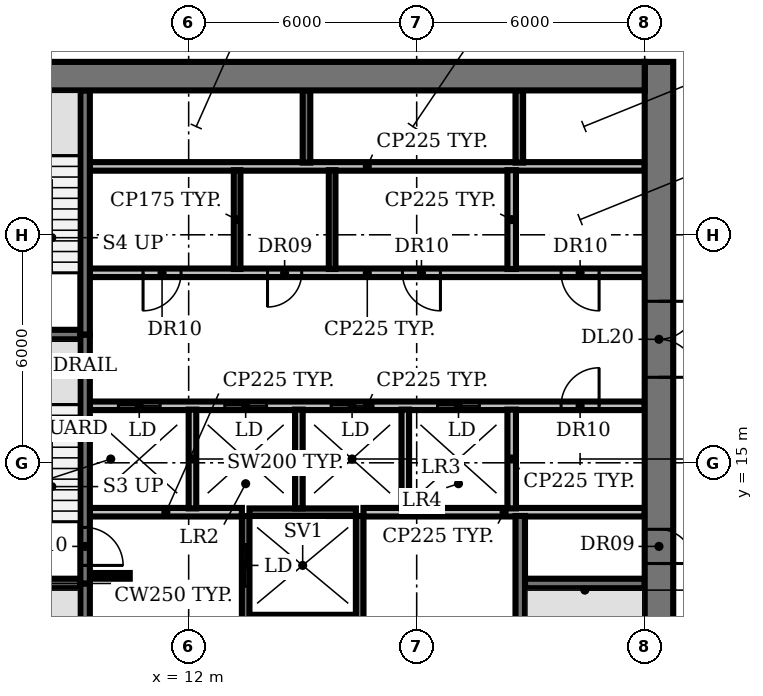
"""IFC4 building model, lengths in metres.
Left out: names, types, materials, properties, quantities, classifications, styles, units other than length and angle.
Written with IfcOpenShell. Run it as: python <this file> out.ifc"""

import sys

from ifc_helpers import new_model, si_unit, direction, frame, frame_2d, origin, place, context, subcontext, project, spatial, rectangle, extrude, element, fill, save


model = new_model("IFC4")
c1 = context("Model", 3, precision=1e-05, world=origin(), true_north=direction((0.0, 1.0)))
c2 = subcontext(c1, "Body", "Model", "MODEL_VIEW")
j1 = project(units=[si_unit("LENGTHUNIT", "METRE"), si_unit("PLANEANGLEUNIT", "RADIAN")], contexts=[c1])
p1 = place(None, origin())
s1 = spatial("IfcSite", under=j1, at=p1, CompositionType="ELEMENT")
p2 = place(p1, origin())
s2 = spatial("IfcBuilding", under=s1, at=p2, CompositionType="ELEMENT")
p3 = place(p2, frame((0.0, 0.0, 87.8)))
s3 = spatial("IfcBuildingStorey", under=s2, at=p3, CompositionType="ELEMENT", Elevation=87.8)
p4 = place(p3, frame((13.6, 10.9, 0.0), z_axis=(0.0, 0.0, 1.0), x_axis=(1.0, 0.0, 0.0)))
e1 = element("IfcWall", 1, at=p4, inside=s3, PredefinedType="SHEAR", context=c2, shape_type="SweptSolid", body=[
    extrude(rectangle(XDim=2.8, YDim=0.2, at=frame_2d((1.4, 0.0))), origin(), (0.0, 0.0, 1.0), 3.85),
])
for number, where, z_axis, x_axis in (
    (2, (6.0, 11.825, 0.0), (0.0, 0.0, 1.0), (1.0, 0.0, 0.0)),
    (3, (20.85, 11.825, 0.0), (0.0, 0.0, 1.0), (1.0, 0.0, 0.0)),
):
    element("IfcWall", number, at=place(p3, frame(where, z_axis=z_axis, x_axis=x_axis)), inside=s3, PredefinedType="SHEAR", context=c2, shape_type="SweptSolid", body=[
        extrude(rectangle(XDim=3.15, YDim=0.25, at=frame_2d((1.575, 0.0))), origin(), (0.0, 0.0, 1.0), 3.85),
    ])
p5 = place(p3, frame((9.4, 12.025, 0.0), z_axis=(0.0, 0.0, 1.0), x_axis=(1.0, 0.0, 0.0)))
e4 = element("IfcWall", 4, at=p5, inside=s3, PredefinedType="SHEAR", context=c2, shape_type="SweptSolid", body=[
    extrude(rectangle(XDim=1.05, YDim=0.15, at=frame_2d((0.525, 0.0))), origin(), (0.0, 0.0, 1.0), 3.85),
])
p6 = place(p3, frame((9.4, 13.7, 0.0), z_axis=(0.0, 0.0, 1.0), x_axis=(1.0, 0.0, 0.0)))
e5 = element("IfcWall", 5, at=p6, inside=s3, PredefinedType="PARTITIONING", context=c2, shape_type="SweptSolid", body=[
    extrude(rectangle(XDim=4.0, YDim=0.225, at=frame_2d((2.0, 0.0))), origin(), (0.0, 0.0, 1.0), 3.85),
])
p7 = place(p3, frame((13.6, 13.7, 0.0), z_axis=(0.0, 0.0, 1.0), x_axis=(1.0, 0.0, 0.0)))
e6 = element("IfcWall", 6, at=p7, inside=s3, PredefinedType="SHEAR", context=c2, shape_type="SweptSolid", body=[
    extrude(rectangle(XDim=2.8, YDim=0.2, at=frame_2d((1.4, 0.0))), origin(), (0.0, 0.0, 1.0), 3.85),
])
p8 = place(p3, frame((16.6, 13.7, 0.0), z_axis=(0.0, 0.0, 1.0), x_axis=(1.0, 0.0, 0.0)))
e7 = element("IfcWall", 7, at=p8, inside=s3, PredefinedType="PARTITIONING", context=c2, shape_type="SweptSolid", body=[
    extrude(rectangle(XDim=7.4, YDim=0.225, at=frame_2d((3.7, 0.0))), origin(), (0.0, 0.0, 1.0), 3.85),
])
p9 = place(p3, frame((9.4, 16.5, 0.0), z_axis=(0.0, 0.0, 1.0), x_axis=(1.0, 0.0, 0.0)))
e8 = element("IfcWall", 8, at=p9, inside=s3, PredefinedType="PARTITIONING", context=c2, shape_type="SweptSolid", body=[
    extrude(rectangle(XDim=14.6, YDim=0.225, at=frame_2d((7.3, 0.0))), origin(), (0.0, 0.0, 1.0), 3.85),
])
p10 = place(p9, frame((0.75, 0.0, 0.0)))
e9 = element("IfcOpeningElement", 9, at=p10, cuts=e8, PredefinedType="OPENING", context=c2, shape_type="SweptSolid", body=[
    extrude(rectangle(XDim=1.1, YDim=2.1, at=frame_2d((0.55, 1.05))), frame((0.0, 0.123, 0.0), z_axis=(0.0, -1.0, 0.0), x_axis=(1.0, 0.0, 0.0)), (0.0, 0.0, 1.0), 0.245),
])
p11 = place(p9, frame((3.55, 0.0, 0.0)))
e10 = element("IfcOpeningElement", 10, at=p11, cuts=e8, PredefinedType="OPENING", context=c2, shape_type="SweptSolid", body=[
    extrude(rectangle(XDim=1.1, YDim=2.1, at=frame_2d((0.55, 1.05))), frame((0.0, 0.123, 0.0), z_axis=(0.0, -1.0, 0.0), x_axis=(1.0, 0.0, 0.0)), (0.0, 0.0, 1.0), 0.245),
])
p12 = place(p9, frame((6.35, 0.0, 0.0)))
e11 = element("IfcOpeningElement", 11, at=p12, cuts=e8, PredefinedType="OPENING", context=c2, shape_type="SweptSolid", body=[
    extrude(rectangle(XDim=1.1, YDim=2.1, at=frame_2d((0.55, 1.05))), frame((0.0, 0.123, 0.0), z_axis=(0.0, -1.0, 0.0), x_axis=(1.0, 0.0, 0.0)), (0.0, 0.0, 1.0), 0.245),
])
p13 = place(p9, frame((9.15, 0.0, 0.0)))
e12 = element("IfcOpeningElement", 12, at=p13, cuts=e8, PredefinedType="OPENING", context=c2, shape_type="SweptSolid", body=[
    extrude(rectangle(XDim=1.1, YDim=2.1, at=frame_2d((0.55, 1.05))), frame((0.0, 0.123, 0.0), z_axis=(0.0, -1.0, 0.0), x_axis=(1.0, 0.0, 0.0)), (0.0, 0.0, 1.0), 0.245),
])
p14 = place(p9, frame((12.4, 0.0, 0.0)))
e13 = element("IfcOpeningElement", 13, at=p14, cuts=e8, PredefinedType="OPENING", context=c2, shape_type="SweptSolid", body=[
    extrude(rectangle(XDim=1.0, YDim=2.1, at=frame_2d((0.5, 1.05))), frame((0.0, 0.123, 0.0), z_axis=(0.0, -1.0, 0.0), x_axis=(1.0, 0.0, 0.0)), (0.0, 0.0, 1.0), 0.245),
])
p15 = place(p3, frame((6.0, 18.375, 0.0), z_axis=(0.0, 0.0, 1.0), x_axis=(1.0, 0.0, 0.0)))
e14 = element("IfcWall", 14, at=p15, inside=s3, PredefinedType="SHEAR", context=c2, shape_type="SweptSolid", body=[
    extrude(rectangle(XDim=3.15, YDim=0.25, at=frame_2d((1.575, 0.0))), origin(), (0.0, 0.0, 1.0), 3.85),
])
p16 = place(p3, frame((24.0, 20.0, 0.0), z_axis=(0.0, 0.0, 1.0), x_axis=(-1.0, 0.0, 0.0)))
e15 = element("IfcWall", 15, at=p16, inside=s3, PredefinedType="PARTITIONING", context=c2, shape_type="SweptSolid", body=[
    extrude(rectangle(XDim=14.6, YDim=0.225, at=frame_2d((7.3, 0.0))), origin(), (0.0, 0.0, 1.0), 3.85),
])
p17 = place(p16, frame((12.2, 0.0, 0.0)))
e16 = element("IfcOpeningElement", 16, at=p17, cuts=e15, PredefinedType="OPENING", context=c2, shape_type="SweptSolid", body=[
    extrude(rectangle(XDim=1.0, YDim=2.1, at=frame_2d((0.5, 1.05))), frame((0.0, 0.123, 0.0), z_axis=(0.0, -1.0, 0.0), x_axis=(1.0, 0.0, 0.0)), (0.0, 0.0, 1.0), 0.245),
])
p18 = place(p16, frame((9.025, 0.0, 0.0)))
e17 = element("IfcOpeningElement", 17, at=p18, cuts=e15, PredefinedType="OPENING", context=c2, shape_type="SweptSolid", body=[
    extrude(rectangle(XDim=0.9, YDim=2.1, at=frame_2d((0.45, 1.05))), frame((0.0, 0.123, 0.0), z_axis=(0.0, -1.0, 0.0), x_axis=(1.0, 0.0, 0.0)), (0.0, 0.0, 1.0), 0.245),
])
p19 = place(p16, frame((5.375, 0.0, 0.0)))
e18 = element("IfcOpeningElement", 18, at=p19, cuts=e15, PredefinedType="OPENING", context=c2, shape_type="SweptSolid", body=[
    extrude(rectangle(XDim=1.0, YDim=2.1, at=frame_2d((0.5, 1.05))), frame((0.0, 0.123, 0.0), z_axis=(0.0, -1.0, 0.0), x_axis=(1.0, 0.0, 0.0)), (0.0, 0.0, 1.0), 0.245),
])
p20 = place(p16, frame((1.2, 0.0, 0.0)))
e19 = element("IfcOpeningElement", 19, at=p20, cuts=e15, PredefinedType="OPENING", context=c2, shape_type="SweptSolid", body=[
    extrude(rectangle(XDim=1.0, YDim=2.1, at=frame_2d((0.5, 1.05))), frame((0.0, 0.123, 0.0), z_axis=(0.0, -1.0, 0.0), x_axis=(1.0, 0.0, 0.0)), (0.0, 0.0, 1.0), 0.245),
])
p21 = place(p3, frame((9.4, 22.8, 0.0), z_axis=(0.0, 0.0, 1.0), x_axis=(1.0, 0.0, 0.0)))
e20 = element("IfcWall", 20, at=p21, inside=s3, PredefinedType="PARTITIONING", context=c2, shape_type="SweptSolid", body=[
    extrude(rectangle(XDim=14.6, YDim=0.225, at=frame_2d((7.3, 0.0))), origin(), (0.0, 0.0, 1.0), 3.85),
])
p22 = place(p3, frame((9.275, 11.825, 0.0), z_axis=(0.0, 0.0, 1.0), x_axis=(0.0, -1.0, 0.0)))
e21 = element("IfcWall", 21, at=p22, inside=s3, PredefinedType="SHEAR", context=c2, shape_type="SweptSolid", body=[
    extrude(rectangle(XDim=6.425, YDim=0.25, at=frame_2d((3.212, 0.0))), origin(), (0.0, 0.0, 1.0), 3.85),
])
p23 = place(p22, frame((5.075, 0.0, 0.0)))
e22 = element("IfcOpeningElement", 22, at=p23, cuts=e21, PredefinedType="OPENING", context=c2, shape_type="SweptSolid", body=[
    extrude(rectangle(XDim=1.0, YDim=2.1, at=frame_2d((0.5, 1.05))), frame((0.0, 0.135, 0.0), z_axis=(0.0, -1.0, 0.0), x_axis=(1.0, 0.0, 0.0)), (0.0, 0.0, 1.0), 0.27),
])
p24 = place(p3, frame((9.275, 18.375, 0.0), z_axis=(0.0, 0.0, 1.0), x_axis=(0.0, -1.0, 0.0)))
e23 = element("IfcWall", 23, at=p24, inside=s3, PredefinedType="SHEAR", context=c2, shape_type="SweptSolid", body=[
    extrude(rectangle(XDim=6.55, YDim=0.25, at=frame_2d((3.275, 0.0))), origin(), (0.0, 0.0, 1.0), 3.85),
])
p25 = place(p24, frame((5.075, 0.0, 0.0)))
e24 = element("IfcOpeningElement", 24, at=p25, cuts=e23, PredefinedType="OPENING", context=c2, shape_type="SweptSolid", body=[
    extrude(rectangle(XDim=1.0, YDim=2.1, at=frame_2d((0.5, 1.05))), frame((0.0, 0.135, 0.0), z_axis=(0.0, -1.0, 0.0), x_axis=(1.0, 0.0, 0.0)), (0.0, 0.0, 1.0), 0.27),
])
p26 = place(p3, frame((9.275, 18.375, 0.0), z_axis=(0.0, 0.0, 1.0), x_axis=(0.0, 1.0, 0.0)))
e25 = element("IfcWall", 25, at=p26, inside=s3, PredefinedType="SHEAR", context=c2, shape_type="SweptSolid", body=[
    extrude(rectangle(XDim=6.425, YDim=0.25, at=frame_2d((3.212, 0.0))), origin(), (0.0, 0.0, 1.0), 3.85),
])
p27 = place(p3, frame((12.1, 13.8, 0.0), z_axis=(0.0, 0.0, 1.0), x_axis=(0.0, 1.0, 0.0)))
e26 = element("IfcWall", 26, at=p27, inside=s3, PredefinedType="SOLIDWALL", context=c2, shape_type="SweptSolid", body=[
    extrude(rectangle(XDim=2.6, YDim=0.2, at=frame_2d((1.3, 0.0))), origin(), (0.0, 0.0, 1.0), 3.85),
])
p28 = place(p3, frame((13.275, 20.1, 0.0), z_axis=(0.0, 0.0, 1.0), x_axis=(0.0, 1.0, 0.0)))
e27 = element("IfcWall", 27, at=p28, inside=s3, PredefinedType="PARTITIONING", context=c2, shape_type="SweptSolid", body=[
    extrude(rectangle(XDim=2.6, YDim=0.175, at=frame_2d((1.3, 0.0))), origin(), (0.0, 0.0, 1.0), 3.85),
])
p29 = place(p3, frame((13.5, 5.4, 0.0), z_axis=(0.0, 0.0, 1.0), x_axis=(0.0, 1.0, 0.0)))
e28 = element("IfcWall", 28, at=p29, inside=s3, PredefinedType="SHEAR", context=c2, shape_type="SweptSolid", body=[
    extrude(rectangle(XDim=8.2, YDim=0.2, at=frame_2d((4.1, 0.0))), origin(), (0.0, 0.0, 1.0), 3.85),
])
p30 = place(p29, frame((0.75, 0.0, 0.0)))
e29 = element("IfcOpeningElement", 29, at=p30, cuts=e28, PredefinedType="OPENING", context=c2, shape_type="SweptSolid", body=[
    extrude(rectangle(XDim=1.1, YDim=2.1, at=frame_2d((0.55, 1.05))), frame((0.0, 0.11, 0.0), z_axis=(0.0, -1.0, 0.0), x_axis=(1.0, 0.0, 0.0)), (0.0, 0.0, 1.0), 0.22),
])
p31 = place(p29, frame((3.55, 0.0, 0.0)))
e30 = element("IfcOpeningElement", 30, at=p31, cuts=e28, PredefinedType="OPENING", context=c2, shape_type="SweptSolid", body=[
    extrude(rectangle(XDim=1.1, YDim=2.1, at=frame_2d((0.55, 1.05))), frame((0.0, 0.11, 0.0), z_axis=(0.0, -1.0, 0.0), x_axis=(1.0, 0.0, 0.0)), (0.0, 0.0, 1.0), 0.22),
])
p32 = place(p29, frame((6.35, 0.0, 0.0)))
e31 = element("IfcOpeningElement", 31, at=p32, cuts=e28, PredefinedType="OPENING", context=c2, shape_type="SweptSolid", body=[
    extrude(rectangle(XDim=1.1, YDim=2.1, at=frame_2d((0.55, 1.05))), frame((0.0, 0.11, 0.0), z_axis=(0.0, -1.0, 0.0), x_axis=(1.0, 0.0, 0.0)), (0.0, 0.0, 1.0), 0.22),
])
p33 = place(p3, frame((14.9, 13.8, 0.0), z_axis=(0.0, 0.0, 1.0), x_axis=(0.0, 1.0, 0.0)))
e32 = element("IfcWall", 32, at=p33, inside=s3, PredefinedType="SOLIDWALL", context=c2, shape_type="SweptSolid", body=[
    extrude(rectangle(XDim=2.6, YDim=0.2, at=frame_2d((1.3, 0.0))), origin(), (0.0, 0.0, 1.0), 3.85),
])
p34 = place(p3, frame((15.1, 22.9, 0.0), z_axis=(0.0, 0.0, 1.0), x_axis=(0.0, 1.0, 0.0)))
e33 = element("IfcWall", 33, at=p34, inside=s3, PredefinedType="SHEAR", context=c2, shape_type="SweptSolid", body=[
    extrude(rectangle(XDim=1.9, YDim=0.2, at=frame_2d((0.95, 0.0))), origin(), (0.0, 0.0, 1.0), 3.85),
])
p35 = place(p3, frame((15.775, 20.1, 0.0), z_axis=(0.0, 0.0, 1.0), x_axis=(0.0, 1.0, 0.0)))
e34 = element("IfcWall", 34, at=p35, inside=s3, PredefinedType="PARTITIONING", context=c2, shape_type="SweptSolid", body=[
    extrude(rectangle(XDim=2.6, YDim=0.175, at=frame_2d((1.3, 0.0))), origin(), (0.0, 0.0, 1.0), 3.85),
])
p36 = place(p3, frame((16.5, 5.4, 0.0), z_axis=(0.0, 0.0, 1.0), x_axis=(0.0, 1.0, 0.0)))
e35 = element("IfcWall", 35, at=p36, inside=s3, PredefinedType="SHEAR", context=c2, shape_type="SweptSolid", body=[
    extrude(rectangle(XDim=8.2, YDim=0.2, at=frame_2d((4.1, 0.0))), origin(), (0.0, 0.0, 1.0), 3.85),
])
p37 = place(p3, frame((17.7, 13.8, 0.0), z_axis=(0.0, 0.0, 1.0), x_axis=(0.0, 1.0, 0.0)))
e36 = element("IfcWall", 36, at=p37, inside=s3, PredefinedType="SOLIDWALL", context=c2, shape_type="SweptSolid", body=[
    extrude(rectangle(XDim=2.6, YDim=0.2, at=frame_2d((1.3, 0.0))), origin(), (0.0, 0.0, 1.0), 3.85),
])
for number, where, z_axis, x_axis in (
    (37, (20.5, 13.8, 0.0), (0.0, 0.0, 1.0), (0.0, 1.0, 0.0)),
    (38, (20.5, 20.1, 0.0), (0.0, 0.0, 1.0), (0.0, 1.0, 0.0)),
):
    element("IfcWall", number, at=place(p3, frame(where, z_axis=z_axis, x_axis=x_axis)), inside=s3, PredefinedType="PARTITIONING", context=c2, shape_type="SweptSolid", body=[
        extrude(rectangle(XDim=2.6, YDim=0.225, at=frame_2d((1.3, 0.0))), origin(), (0.0, 0.0, 1.0), 3.85),
    ])
p38 = place(p3, frame((20.7, 22.9, 0.0), z_axis=(0.0, 0.0, 1.0), x_axis=(0.0, 1.0, 0.0)))
e39 = element("IfcWall", 39, at=p38, inside=s3, PredefinedType="SHEAR", context=c2, shape_type="SweptSolid", body=[
    extrude(rectangle(XDim=1.9, YDim=0.2, at=frame_2d((0.95, 0.0))), origin(), (0.0, 0.0, 1.0), 3.85),
])
p39 = place(p3, frame((20.725, 5.4, 0.0), z_axis=(0.0, 0.0, 1.0), x_axis=(0.0, 1.0, 0.0)))
e40 = element("IfcWall", 40, at=p39, inside=s3, PredefinedType="SHEAR", context=c2, shape_type="SweptSolid", body=[
    extrude(rectangle(XDim=8.2, YDim=0.25, at=frame_2d((4.1, 0.0))), origin(), (0.0, 0.0, 1.0), 3.85),
])
p40 = place(p3, frame((24.375, 25.55, 0.0), z_axis=(0.0, 0.0, 1.0), x_axis=(0.0, -1.0, 0.0)))
e41 = element("IfcWall", 41, at=p40, inside=s3, PredefinedType="SHEAR", context=c2, shape_type="SweptSolid", body=[
    extrude(rectangle(XDim=21.08, YDim=0.75, at=frame_2d((10.54, 0.0))), origin(), (0.0, 0.0, 1.0), 3.85),
])
p41 = place(p40, frame((18.4, 0.0, 0.0)))
e42 = element("IfcOpeningElement", 42, at=p41, cuts=e41, PredefinedType="OPENING", context=c2, shape_type="SweptSolid", body=[
    extrude(rectangle(XDim=1.5, YDim=2.1, at=frame_2d((0.75, 1.05))), frame((0.0, 0.385, 0.0), z_axis=(0.0, -1.0, 0.0), x_axis=(1.0, 0.0, 0.0)), (0.0, 0.0, 1.0), 0.77),
])
p42 = place(p40, frame((12.3, 0.0, 0.0)))
e43 = element("IfcOpeningElement", 43, at=p42, cuts=e41, PredefinedType="OPENING", context=c2, shape_type="SweptSolid", body=[
    extrude(rectangle(XDim=0.9, YDim=2.1, at=frame_2d((0.45, 1.05))), frame((0.0, 0.385, 0.0), z_axis=(0.0, -1.0, 0.0), x_axis=(1.0, 0.0, 0.0)), (0.0, 0.0, 1.0), 0.77),
])
p43 = place(p40, frame((6.3, 0.0, 0.0)))
e44 = element("IfcOpeningElement", 44, at=p43, cuts=e41, PredefinedType="OPENING", context=c2, shape_type="SweptSolid", body=[
    extrude(rectangle(XDim=2.0, YDim=2.1, at=frame_2d((1.0, 1.05))), frame((0.0, 0.385, 0.0), z_axis=(0.0, -1.0, 0.0), x_axis=(1.0, 0.0, 0.0)), (0.0, 0.0, 1.0), 0.77),
])
p44 = place(p3, frame((6.0, 25.175, 0.0), z_axis=(0.0, 0.0, 1.0), x_axis=(1.0, 0.0, 0.0)))
e45 = element("IfcWall", 45, at=p44, inside=s3, PredefinedType="SHEAR", context=c2, shape_type="SweptSolid", body=[
    extrude(rectangle(XDim=18.0, YDim=0.75, at=frame_2d((9.0, 0.0))), origin(), (0.0, 0.0, 1.0), 3.85),
])
p45 = place(p10, origin())
e46 = element("IfcDoor", 46, at=p45, inside=s3, OperationType="DOUBLE_DOOR_SLIDING", PredefinedType="DOOR", context=c2, shape_type="SweptSolid", body=[
    extrude(rectangle(XDim=1.1, YDim=2.1, at=frame_2d((0.55, 1.05))), frame((0.0, 0.025, 0.0), z_axis=(0.0, -1.0, 0.0), x_axis=(1.0, 0.0, 0.0)), (0.0, 0.0, 1.0), 0.05),
])
fill(e9, e46)
p46 = place(p11, origin())
e47 = element("IfcDoor", 47, at=p46, inside=s3, OperationType="DOUBLE_DOOR_SLIDING", PredefinedType="DOOR", context=c2, shape_type="SweptSolid", body=[
    extrude(rectangle(XDim=1.1, YDim=2.1, at=frame_2d((0.55, 1.05))), frame((0.0, 0.025, 0.0), z_axis=(0.0, -1.0, 0.0), x_axis=(1.0, 0.0, 0.0)), (0.0, 0.0, 1.0), 0.05),
])
fill(e10, e47)
p47 = place(p12, origin())
e48 = element("IfcDoor", 48, at=p47, inside=s3, OperationType="DOUBLE_DOOR_SLIDING", PredefinedType="DOOR", context=c2, shape_type="SweptSolid", body=[
    extrude(rectangle(XDim=1.1, YDim=2.1, at=frame_2d((0.55, 1.05))), frame((0.0, 0.025, 0.0), z_axis=(0.0, -1.0, 0.0), x_axis=(1.0, 0.0, 0.0)), (0.0, 0.0, 1.0), 0.05),
])
fill(e11, e48)
p48 = place(p13, origin())
e49 = element("IfcDoor", 49, at=p48, inside=s3, OperationType="DOUBLE_DOOR_SLIDING", PredefinedType="DOOR", context=c2, shape_type="SweptSolid", body=[
    extrude(rectangle(XDim=1.1, YDim=2.1, at=frame_2d((0.55, 1.05))), frame((0.0, 0.025, 0.0), z_axis=(0.0, -1.0, 0.0), x_axis=(1.0, 0.0, 0.0)), (0.0, 0.0, 1.0), 0.05),
])
fill(e12, e49)
p49 = place(p14, origin())
e50 = element("IfcDoor", 50, at=p49, inside=s3, OperationType="SINGLE_SWING_RIGHT", PredefinedType="DOOR", context=c2, shape_type="SweptSolid", body=[
    extrude(rectangle(XDim=1.0, YDim=2.1, at=frame_2d((0.5, 1.05))), frame((0.0, 0.025, 0.0), z_axis=(0.0, -1.0, 0.0), x_axis=(1.0, 0.0, 0.0)), (0.0, 0.0, 1.0), 0.05),
])
fill(e13, e50)
p50 = place(p17, origin())
e51 = element("IfcDoor", 51, at=p50, inside=s3, OperationType="SINGLE_SWING_RIGHT", PredefinedType="DOOR", context=c2, shape_type="SweptSolid", body=[
    extrude(rectangle(XDim=1.0, YDim=2.1, at=frame_2d((0.5, 1.05))), frame((0.0, 0.025, 0.0), z_axis=(0.0, -1.0, 0.0), x_axis=(1.0, 0.0, 0.0)), (0.0, 0.0, 1.0), 0.05),
])
fill(e16, e51)
p51 = place(p18, origin())
e52 = element("IfcDoor", 52, at=p51, inside=s3, OperationType="SINGLE_SWING_RIGHT", PredefinedType="DOOR", context=c2, shape_type="SweptSolid", body=[
    extrude(rectangle(XDim=0.9, YDim=2.1, at=frame_2d((0.45, 1.05))), frame((0.0, 0.025, 0.0), z_axis=(0.0, -1.0, 0.0), x_axis=(1.0, 0.0, 0.0)), (0.0, 0.0, 1.0), 0.05),
])
fill(e17, e52)
p52 = place(p19, origin())
e53 = element("IfcDoor", 53, at=p52, inside=s3, OperationType="SINGLE_SWING_LEFT", PredefinedType="DOOR", context=c2, shape_type="SweptSolid", body=[
    extrude(rectangle(XDim=1.0, YDim=2.1, at=frame_2d((0.5, 1.05))), frame((0.0, 0.025, 0.0), z_axis=(0.0, -1.0, 0.0), x_axis=(1.0, 0.0, 0.0)), (0.0, 0.0, 1.0), 0.05),
])
fill(e18, e53)
p53 = place(p20, origin())
e54 = element("IfcDoor", 54, at=p53, inside=s3, OperationType="SINGLE_SWING_LEFT", PredefinedType="DOOR", context=c2, shape_type="SweptSolid", body=[
    extrude(rectangle(XDim=1.0, YDim=2.1, at=frame_2d((0.5, 1.05))), frame((0.0, 0.025, 0.0), z_axis=(0.0, -1.0, 0.0), x_axis=(1.0, 0.0, 0.0)), (0.0, 0.0, 1.0), 0.05),
])
fill(e19, e54)
p54 = place(p25, origin())
e55 = element("IfcDoor", 55, at=p54, inside=s3, OperationType="SINGLE_SWING_RIGHT", PredefinedType="DOOR", context=c2, shape_type="SweptSolid", body=[
    extrude(rectangle(XDim=1.0, YDim=2.1, at=frame_2d((0.5, 1.05))), frame((0.0, 0.025, 0.0), z_axis=(0.0, -1.0, 0.0), x_axis=(1.0, 0.0, 0.0)), (0.0, 0.0, 1.0), 0.05),
])
fill(e24, e55)
p55 = place(p32, origin())
e56 = element("IfcDoor", 56, at=p55, inside=s3, OperationType="DOUBLE_DOOR_SLIDING", PredefinedType="DOOR", context=c2, shape_type="SweptSolid", body=[
    extrude(rectangle(XDim=1.1, YDim=2.1, at=frame_2d((0.55, 1.05))), frame((0.0, 0.025, 0.0), z_axis=(0.0, -1.0, 0.0), x_axis=(1.0, 0.0, 0.0)), (0.0, 0.0, 1.0), 0.05),
])
fill(e31, e56)
p56 = place(p42, origin())
e57 = element("IfcDoor", 57, at=p56, inside=s3, OperationType="SINGLE_SWING_RIGHT", PredefinedType="DOOR", context=c2, shape_type="SweptSolid", body=[
    extrude(rectangle(XDim=0.9, YDim=2.1, at=frame_2d((0.45, 1.05))), frame((0.0, -0.315, 0.0), z_axis=(0.0, -1.0, 0.0), x_axis=(1.0, 0.0, 0.0)), (0.0, 0.0, 1.0), 0.05),
])
fill(e43, e57)
p57 = place(p43, origin())
e58 = element("IfcDoor", 58, at=p57, inside=s3, OperationType="DOUBLE_DOOR_SINGLE_SWING", PredefinedType="DOOR", context=c2, shape_type="SweptSolid", body=[
    extrude(rectangle(XDim=2.0, YDim=2.1, at=frame_2d((1.0, 1.05))), frame((0.0, 0.025, 0.0), z_axis=(0.0, -1.0, 0.0), x_axis=(1.0, 0.0, 0.0)), (0.0, 0.0, 1.0), 0.05),
])
fill(e44, e58)
save(model, sys.argv[1])
